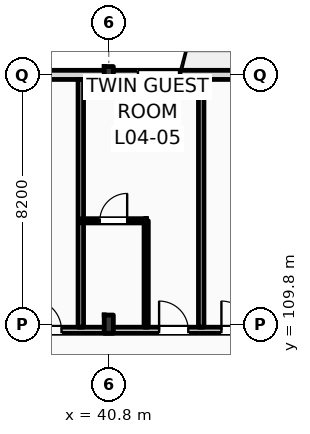
"""IFC4 building model, lengths in metres.
Left out: names, types, materials, properties, quantities, classifications, styles, units other than length and angle.
Written with IfcOpenShell. Run it as: python <this file> out.ifc"""

import sys

from ifc_helpers import new_model, si_unit, direction, frame, frame_2d, origin, origin_2d, place, context, subcontext, project, spatial, rectangle, i_section, extrude, element, fill, save


model = new_model("IFC4")
c1 = context("Model", 3, precision=1e-05, world=origin(), true_north=direction((0.0, 1.0)))
c2 = subcontext(c1, "Body", "Model", "MODEL_VIEW")
j1 = project(units=[si_unit("LENGTHUNIT", "METRE"), si_unit("PLANEANGLEUNIT", "RADIAN")], contexts=[c1])
p1 = place(None, origin())
s1 = spatial("IfcSite", under=j1, at=p1, CompositionType="ELEMENT")
p2 = place(p1, origin())
s2 = spatial("IfcBuilding", under=s1, at=p2, CompositionType="ELEMENT")
p3 = place(p2, frame((0.0, 0.0, 20.4)))
s3 = spatial("IfcBuildingStorey", under=s2, at=p3, CompositionType="ELEMENT", Elevation=20.4)
p4 = place(p3, frame((40.8, 109.8, 0.0), z_axis=(0.0, 0.0, 1.0), x_axis=(1.0, 0.0, 0.0)))
e1 = element("IfcColumn", 1, at=p4, inside=s3, PredefinedType="COLUMN", context=c2, shape_type="SweptSolid", body=[
    extrude(i_section(OverallWidth=0.3, OverallDepth=0.6, WebThickness=0.015, FlangeThickness=0.03, FilletRadius=0.027, at=origin_2d()), origin(), (0.0, 0.0, 1.0), 4.2),
])
p5 = place(p3, frame((40.8, 118.0, 0.0), z_axis=(0.0, 0.0, 1.0), x_axis=(1.0, 0.0, 0.0)))
e2 = element("IfcColumn", 2, at=p5, inside=s3, PredefinedType="COLUMN", context=c2, shape_type="SweptSolid", body=[
    extrude(i_section(OverallWidth=0.3, OverallDepth=0.55, WebThickness=0.015, FlangeThickness=0.029, FilletRadius=0.027, at=origin_2d()), origin(), (0.0, 0.0, 1.0), 4.2),
])
p6 = place(p3, frame((22.5, 118.0, 0.0), z_axis=(0.0, 0.0, 1.0), x_axis=(1.0, 0.0, 0.0)))
e3 = element("IfcWall", 3, at=p6, inside=s3, PredefinedType="STANDARD", context=c2, shape_type="SweptSolid", body=[
    extrude(rectangle(XDim=97.5, YDim=0.3, at=frame_2d((48.75, 0.0))), origin(), (0.0, 0.0, 1.0), 3.38),
])
p7 = place(p6, frame((0.91, 0.0, 0.9)))
e4 = element("IfcOpeningElement", 4, at=p7, cuts=e3, PredefinedType="OPENING", context=c2, shape_type="SweptSolid", body=[
    extrude(rectangle(XDim=0.9, YDim=1.8, at=frame_2d((0.45, 0.9))), frame((0.0, 0.16, 0.0), z_axis=(0.0, -1.0, 0.0), x_axis=(1.0, 0.0, 0.0)), (0.0, 0.0, 1.0), 0.32),
])
p8 = place(p6, frame((6.36, 0.0, 0.0)))
e5 = element("IfcOpeningElement", 5, at=p8, cuts=e3, PredefinedType="OPENING", context=c2, shape_type="SweptSolid", body=[
    extrude(rectangle(XDim=1.2, YDim=2.25, at=frame_2d((0.6, 1.125))), frame((0.0, 0.16, 0.0), z_axis=(0.0, -1.0, 0.0), x_axis=(1.0, 0.0, 0.0)), (0.0, 0.0, 1.0), 0.32),
])
p9 = place(p6, frame((11.41, 0.0, 0.9)))
e6 = element("IfcOpeningElement", 6, at=p9, cuts=e3, PredefinedType="OPENING", context=c2, shape_type="SweptSolid", body=[
    extrude(rectangle(XDim=1.1, YDim=1.9, at=frame_2d((0.55, 0.95))), frame((0.0, 0.16, 0.0), z_axis=(0.0, -1.0, 0.0), x_axis=(1.0, 0.0, 0.0)), (0.0, 0.0, 1.0), 0.32),
])
p10 = place(p6, frame((14.335, 0.0, 0.9)))
e7 = element("IfcOpeningElement", 7, at=p10, cuts=e3, PredefinedType="OPENING", context=c2, shape_type="SweptSolid", body=[
    extrude(rectangle(XDim=1.65, YDim=1.95, at=frame_2d((0.825, 0.975))), frame((0.0, 0.16, 0.0), z_axis=(0.0, -1.0, 0.0), x_axis=(1.0, 0.0, 0.0)), (0.0, 0.0, 1.0), 0.32),
])
p11 = place(p6, frame((19.26, 0.0, 0.9)))
e8 = element("IfcOpeningElement", 8, at=p11, cuts=e3, PredefinedType="OPENING", context=c2, shape_type="SweptSolid", body=[
    extrude(rectangle(XDim=1.35, YDim=2.0, at=frame_2d((0.675, 1.0))), frame((0.0, 0.16, 0.0), z_axis=(0.0, -1.0, 0.0), x_axis=(1.0, 0.0, 0.0)), (0.0, 0.0, 1.0), 0.32),
])
p12 = place(p6, frame((22.8, 0.0, 0.0)))
e9 = element("IfcOpeningElement", 9, at=p12, cuts=e3, PredefinedType="OPENING", context=c2, shape_type="SweptSolid", body=[
    extrude(rectangle(XDim=1.2, YDim=2.25, at=frame_2d((0.6, 1.125))), frame((0.0, 0.16, 0.0), z_axis=(0.0, -1.0, 0.0), x_axis=(1.0, 0.0, 0.0)), (0.0, 0.0, 1.0), 0.32),
])
p13 = place(p6, frame((26.91, 0.0, 0.9)))
e10 = element("IfcOpeningElement", 10, at=p13, cuts=e3, PredefinedType="OPENING", context=c2, shape_type="SweptSolid", body=[
    extrude(rectangle(XDim=2.1, YDim=2.1, at=frame_2d((1.05, 1.05))), frame((0.0, 0.16, 0.0), z_axis=(0.0, -1.0, 0.0), x_axis=(1.0, 0.0, 0.0)), (0.0, 0.0, 1.0), 0.32),
])
p14 = place(p6, frame((30.835, 0.0, 0.9)))
e11 = element("IfcOpeningElement", 11, at=p14, cuts=e3, PredefinedType="OPENING", context=c2, shape_type="SweptSolid", body=[
    extrude(rectangle(XDim=2.25, YDim=2.15, at=frame_2d((1.125, 1.075))), frame((0.0, 0.16, 0.0), z_axis=(0.0, -1.0, 0.0), x_axis=(1.0, 0.0, 0.0)), (0.0, 0.0, 1.0), 0.32),
])
p15 = place(p6, frame((34.96, 0.0, 0.9)))
e12 = element("IfcOpeningElement", 12, at=p15, cuts=e3, PredefinedType="OPENING", context=c2, shape_type="SweptSolid", body=[
    extrude(rectangle(XDim=2.4, YDim=2.2, at=frame_2d((1.2, 1.1))), frame((0.0, 0.16, 0.0), z_axis=(0.0, -1.0, 0.0), x_axis=(1.0, 0.0, 0.0)), (0.0, 0.0, 1.0), 0.32),
])
p16 = place(p6, frame((39.0, 0.0, 0.0)))
e13 = element("IfcOpeningElement", 13, at=p16, cuts=e3, PredefinedType="OPENING", context=c2, shape_type="SweptSolid", body=[
    extrude(rectangle(XDim=1.2, YDim=2.25, at=frame_2d((0.6, 1.125))), frame((0.0, 0.16, 0.0), z_axis=(0.0, -1.0, 0.0), x_axis=(1.0, 0.0, 0.0)), (0.0, 0.0, 1.0), 0.32),
])
p17 = place(p6, frame((43.21, 0.0, 0.9)))
e14 = element("IfcOpeningElement", 14, at=p17, cuts=e3, PredefinedType="OPENING", context=c2, shape_type="SweptSolid", body=[
    extrude(rectangle(XDim=2.7, YDim=2.3, at=frame_2d((1.35, 1.15))), frame((0.0, 0.16, 0.0), z_axis=(0.0, -1.0, 0.0), x_axis=(1.0, 0.0, 0.0)), (0.0, 0.0, 1.0), 0.32),
])
p18 = place(p6, frame((47.335, 0.0, 0.9)))
e15 = element("IfcOpeningElement", 15, at=p18, cuts=e3, PredefinedType="OPENING", context=c2, shape_type="SweptSolid", body=[
    extrude(rectangle(XDim=1.35, YDim=2.3, at=frame_2d((0.675, 1.15))), frame((0.0, 0.16, 0.0), z_axis=(0.0, -1.0, 0.0), x_axis=(1.0, 0.0, 0.0)), (0.0, 0.0, 1.0), 0.32),
])
p19 = place(p6, frame((52.74, 0.0, 0.0)))
e16 = element("IfcOpeningElement", 16, at=p19, cuts=e3, PredefinedType="OPENING", context=c2, shape_type="SweptSolid", body=[
    extrude(rectangle(XDim=1.2, YDim=2.25, at=frame_2d((0.6, 1.125))), frame((0.0, 0.16, 0.0), z_axis=(0.0, -1.0, 0.0), x_axis=(1.0, 0.0, 0.0)), (0.0, 0.0, 1.0), 0.32),
])
p20 = place(p6, frame((55.36, 0.0, 0.9)))
e17 = element("IfcOpeningElement", 17, at=p20, cuts=e3, PredefinedType="OPENING", context=c2, shape_type="SweptSolid", body=[
    extrude(rectangle(XDim=1.1, YDim=2.3, at=frame_2d((0.55, 1.15))), frame((0.0, 0.16, 0.0), z_axis=(0.0, -1.0, 0.0), x_axis=(1.0, 0.0, 0.0)), (0.0, 0.0, 1.0), 0.32),
])
p21 = place(p6, frame((59.99, 0.0, 0.9)))
e18 = element("IfcOpeningElement", 18, at=p21, cuts=e3, PredefinedType="OPENING", context=c2, shape_type="SweptSolid", body=[
    extrude(rectangle(XDim=2.74, YDim=2.3, at=frame_2d((1.37, 1.15))), frame((0.0, 0.16, 0.0), z_axis=(0.0, -1.0, 0.0), x_axis=(1.0, 0.0, 0.0)), (0.0, 0.0, 1.0), 0.32),
])
p22 = place(p6, frame((65.95, 0.0, 0.9)))
e19 = element("IfcOpeningElement", 19, at=p22, cuts=e3, PredefinedType="OPENING", context=c2, shape_type="SweptSolid", body=[
    extrude(rectangle(XDim=1.35, YDim=2.3, at=frame_2d((0.675, 1.15))), frame((0.0, 0.16, 0.0), z_axis=(0.0, -1.0, 0.0), x_axis=(1.0, 0.0, 0.0)), (0.0, 0.0, 1.0), 0.32),
])
p23 = place(p6, frame((69.16, 0.0, 0.0)))
e20 = element("IfcOpeningElement", 20, at=p23, cuts=e3, PredefinedType="OPENING", context=c2, shape_type="SweptSolid", body=[
    extrude(rectangle(XDim=1.2, YDim=2.25, at=frame_2d((0.6, 1.125))), frame((0.0, 0.16, 0.0), z_axis=(0.0, -1.0, 0.0), x_axis=(1.0, 0.0, 0.0)), (0.0, 0.0, 1.0), 0.32),
])
p24 = place(p6, frame((73.75, 0.0, 0.9)))
e21 = element("IfcOpeningElement", 21, at=p24, cuts=e3, PredefinedType="OPENING", context=c2, shape_type="SweptSolid", body=[
    extrude(rectangle(XDim=1.8, YDim=2.3, at=frame_2d((0.9, 1.15))), frame((0.0, 0.16, 0.0), z_axis=(0.0, -1.0, 0.0), x_axis=(1.0, 0.0, 0.0)), (0.0, 0.0, 1.0), 0.32),
])
p25 = place(p6, frame((76.79, 0.0, 0.9)))
e22 = element("IfcOpeningElement", 22, at=p25, cuts=e3, PredefinedType="OPENING", context=c2, shape_type="SweptSolid", body=[
    extrude(rectangle(XDim=2.74, YDim=2.3, at=frame_2d((1.37, 1.15))), frame((0.0, 0.16, 0.0), z_axis=(0.0, -1.0, 0.0), x_axis=(1.0, 0.0, 0.0)), (0.0, 0.0, 1.0), 0.32),
])
p26 = place(p6, frame((81.55, 0.0, 0.9)))
e23 = element("IfcOpeningElement", 23, at=p26, cuts=e3, PredefinedType="OPENING", context=c2, shape_type="SweptSolid", body=[
    extrude(rectangle(XDim=1.8, YDim=2.3, at=frame_2d((0.9, 1.15))), frame((0.0, 0.16, 0.0), z_axis=(0.0, -1.0, 0.0), x_axis=(1.0, 0.0, 0.0)), (0.0, 0.0, 1.0), 0.32),
])
p27 = place(p6, frame((86.01, 0.0, 0.9)))
e24 = element("IfcOpeningElement", 24, at=p27, cuts=e3, PredefinedType="OPENING", context=c2, shape_type="SweptSolid", body=[
    extrude(rectangle(XDim=1.1, YDim=1.5, at=frame_2d((0.55, 0.75))), frame((0.0, 0.16, 0.0), z_axis=(0.0, -1.0, 0.0), x_axis=(1.0, 0.0, 0.0)), (0.0, 0.0, 1.0), 0.32),
])
p28 = place(p6, frame((90.135, 0.0, 0.9)))
e25 = element("IfcOpeningElement", 25, at=p28, cuts=e3, PredefinedType="OPENING", context=c2, shape_type="SweptSolid", body=[
    extrude(rectangle(XDim=1.25, YDim=1.6, at=frame_2d((0.625, 0.8))), frame((0.0, 0.16, 0.0), z_axis=(0.0, -1.0, 0.0), x_axis=(1.0, 0.0, 0.0)), (0.0, 0.0, 1.0), 0.32),
])
p29 = place(p6, frame((94.34, 0.0, 0.9)))
e26 = element("IfcOpeningElement", 26, at=p29, cuts=e3, PredefinedType="OPENING", context=c2, shape_type="SweptSolid", body=[
    extrude(rectangle(XDim=1.4, YDim=1.7, at=frame_2d((0.7, 0.85))), frame((0.0, 0.16, 0.0), z_axis=(0.0, -1.0, 0.0), x_axis=(1.0, 0.0, 0.0)), (0.0, 0.0, 1.0), 0.32),
])
p30 = place(p3, frame((10.65, 109.6, 0.0), z_axis=(0.0, 0.0, 1.0), x_axis=(1.0, 0.0, 0.0)))
e27 = element("IfcWall", 27, at=p30, inside=s3, PredefinedType="PARTITIONING", context=c2, shape_type="SweptSolid", body=[
    extrude(rectangle(XDim=109.21, YDim=0.2, at=frame_2d((54.605, 0.0))), origin(), (0.0, 0.0, 1.0), 3.38),
])
p31 = place(p30, frame((12.535, 0.0, 0.0)))
e28 = element("IfcOpeningElement", 28, at=p31, cuts=e27, PredefinedType="OPENING", context=c2, shape_type="SweptSolid", body=[
    extrude(rectangle(XDim=1.02, YDim=2.2, at=frame_2d((0.51, 1.1))), frame((0.0, 0.11, 0.0), z_axis=(0.0, -1.0, 0.0), x_axis=(1.0, 0.0, 0.0)), (0.0, 0.0, 1.0), 0.22),
])
p32 = place(p30, frame((19.175, 0.0, 0.0)))
e29 = element("IfcOpeningElement", 29, at=p32, cuts=e27, PredefinedType="OPENING", context=c2, shape_type="SweptSolid", body=[
    extrude(rectangle(XDim=1.02, YDim=2.2, at=frame_2d((0.51, 1.1))), frame((0.0, 0.11, 0.0), z_axis=(0.0, -1.0, 0.0), x_axis=(1.0, 0.0, 0.0)), (0.0, 0.0, 1.0), 0.22),
])
p33 = place(p30, frame((23.375, 0.0, 0.0)))
e30 = element("IfcOpeningElement", 30, at=p33, cuts=e27, PredefinedType="OPENING", context=c2, shape_type="SweptSolid", body=[
    extrude(rectangle(XDim=1.02, YDim=2.2, at=frame_2d((0.51, 1.1))), frame((0.0, 0.11, 0.0), z_axis=(0.0, -1.0, 0.0), x_axis=(1.0, 0.0, 0.0)), (0.0, 0.0, 1.0), 0.22),
])
p34 = place(p30, frame((27.575, 0.0, 0.0)))
e31 = element("IfcOpeningElement", 31, at=p34, cuts=e27, PredefinedType="OPENING", context=c2, shape_type="SweptSolid", body=[
    extrude(rectangle(XDim=1.02, YDim=2.2, at=frame_2d((0.51, 1.1))), frame((0.0, 0.11, 0.0), z_axis=(0.0, -1.0, 0.0), x_axis=(1.0, 0.0, 0.0)), (0.0, 0.0, 1.0), 0.22),
])
p35 = place(p30, frame((31.805, 0.0, 0.0)))
e32 = element("IfcOpeningElement", 32, at=p35, cuts=e27, PredefinedType="OPENING", context=c2, shape_type="SweptSolid", body=[
    extrude(rectangle(XDim=0.96, YDim=2.2, at=frame_2d((0.48, 1.1))), frame((0.0, 0.11, 0.0), z_axis=(0.0, -1.0, 0.0), x_axis=(1.0, 0.0, 0.0)), (0.0, 0.0, 1.0), 0.22),
])
p36 = place(p30, frame((33.855, 0.0, 0.0)))
e33 = element("IfcOpeningElement", 33, at=p36, cuts=e27, PredefinedType="OPENING", context=c2, shape_type="SweptSolid", body=[
    extrude(rectangle(XDim=0.96, YDim=2.2, at=frame_2d((0.48, 1.1))), frame((0.0, 0.11, 0.0), z_axis=(0.0, -1.0, 0.0), x_axis=(1.0, 0.0, 0.0)), (0.0, 0.0, 1.0), 0.22),
])
p37 = place(p30, frame((40.205, 0.0, 0.0)))
e34 = element("IfcOpeningElement", 34, at=p37, cuts=e27, PredefinedType="OPENING", context=c2, shape_type="SweptSolid", body=[
    extrude(rectangle(XDim=0.96, YDim=2.2, at=frame_2d((0.48, 1.1))), frame((0.0, 0.11, 0.0), z_axis=(0.0, -1.0, 0.0), x_axis=(1.0, 0.0, 0.0)), (0.0, 0.0, 1.0), 0.22),
])
p38 = place(p30, frame((42.255, 0.0, 0.0)))
e35 = element("IfcOpeningElement", 35, at=p38, cuts=e27, PredefinedType="OPENING", context=c2, shape_type="SweptSolid", body=[
    extrude(rectangle(XDim=0.96, YDim=2.2, at=frame_2d((0.48, 1.1))), frame((0.0, 0.11, 0.0), z_axis=(0.0, -1.0, 0.0), x_axis=(1.0, 0.0, 0.0)), (0.0, 0.0, 1.0), 0.22),
])
p39 = place(p30, frame((48.605, 0.0, 0.0)))
e36 = element("IfcOpeningElement", 36, at=p39, cuts=e27, PredefinedType="OPENING", context=c2, shape_type="SweptSolid", body=[
    extrude(rectangle(XDim=0.96, YDim=2.2, at=frame_2d((0.48, 1.1))), frame((0.0, 0.11, 0.0), z_axis=(0.0, -1.0, 0.0), x_axis=(1.0, 0.0, 0.0)), (0.0, 0.0, 1.0), 0.22),
])
p40 = place(p30, frame((50.655, 0.0, 0.0)))
e37 = element("IfcOpeningElement", 37, at=p40, cuts=e27, PredefinedType="OPENING", context=c2, shape_type="SweptSolid", body=[
    extrude(rectangle(XDim=0.96, YDim=2.2, at=frame_2d((0.48, 1.1))), frame((0.0, 0.11, 0.0), z_axis=(0.0, -1.0, 0.0), x_axis=(1.0, 0.0, 0.0)), (0.0, 0.0, 1.0), 0.22),
])
p41 = place(p30, frame((57.005, 0.0, 0.0)))
e38 = element("IfcOpeningElement", 38, at=p41, cuts=e27, PredefinedType="OPENING", context=c2, shape_type="SweptSolid", body=[
    extrude(rectangle(XDim=0.96, YDim=2.2, at=frame_2d((0.48, 1.1))), frame((0.0, 0.11, 0.0), z_axis=(0.0, -1.0, 0.0), x_axis=(1.0, 0.0, 0.0)), (0.0, 0.0, 1.0), 0.22),
])
p42 = place(p30, frame((59.055, 0.0, 0.0)))
e39 = element("IfcOpeningElement", 39, at=p42, cuts=e27, PredefinedType="OPENING", context=c2, shape_type="SweptSolid", body=[
    extrude(rectangle(XDim=0.96, YDim=2.2, at=frame_2d((0.48, 1.1))), frame((0.0, 0.11, 0.0), z_axis=(0.0, -1.0, 0.0), x_axis=(1.0, 0.0, 0.0)), (0.0, 0.0, 1.0), 0.22),
])
p43 = place(p30, frame((65.405, 0.0, 0.0)))
e40 = element("IfcOpeningElement", 40, at=p43, cuts=e27, PredefinedType="OPENING", context=c2, shape_type="SweptSolid", body=[
    extrude(rectangle(XDim=0.96, YDim=2.2, at=frame_2d((0.48, 1.1))), frame((0.0, 0.11, 0.0), z_axis=(0.0, -1.0, 0.0), x_axis=(1.0, 0.0, 0.0)), (0.0, 0.0, 1.0), 0.22),
])
p44 = place(p30, frame((67.205, 0.0, 0.0)))
e41 = element("IfcOpeningElement", 41, at=p44, cuts=e27, PredefinedType="OPENING", context=c2, shape_type="SweptSolid", body=[
    extrude(rectangle(XDim=0.96, YDim=2.2, at=frame_2d((0.48, 1.1))), frame((0.0, 0.11, 0.0), z_axis=(0.0, -1.0, 0.0), x_axis=(1.0, 0.0, 0.0)), (0.0, 0.0, 1.0), 0.22),
])
p45 = place(p30, frame((73.805, 0.0, 0.0)))
e42 = element("IfcOpeningElement", 42, at=p45, cuts=e27, PredefinedType="OPENING", context=c2, shape_type="SweptSolid", body=[
    extrude(rectangle(XDim=0.96, YDim=2.2, at=frame_2d((0.48, 1.1))), frame((0.0, 0.11, 0.0), z_axis=(0.0, -1.0, 0.0), x_axis=(1.0, 0.0, 0.0)), (0.0, 0.0, 1.0), 0.22),
])
p46 = place(p30, frame((78.255, 0.0, 0.0)))
e43 = element("IfcOpeningElement", 43, at=p46, cuts=e27, PredefinedType="OPENING", context=c2, shape_type="SweptSolid", body=[
    extrude(rectangle(XDim=0.96, YDim=2.2, at=frame_2d((0.48, 1.1))), frame((0.0, 0.11, 0.0), z_axis=(0.0, -1.0, 0.0), x_axis=(1.0, 0.0, 0.0)), (0.0, 0.0, 1.0), 0.22),
])
p47 = place(p30, frame((82.205, 0.0, 0.0)))
e44 = element("IfcOpeningElement", 44, at=p47, cuts=e27, PredefinedType="OPENING", context=c2, shape_type="SweptSolid", body=[
    extrude(rectangle(XDim=0.96, YDim=2.2, at=frame_2d((0.48, 1.1))), frame((0.0, 0.11, 0.0), z_axis=(0.0, -1.0, 0.0), x_axis=(1.0, 0.0, 0.0)), (0.0, 0.0, 1.0), 0.22),
])
p48 = place(p30, frame((86.405, 0.0, 0.0)))
e45 = element("IfcOpeningElement", 45, at=p48, cuts=e27, PredefinedType="OPENING", context=c2, shape_type="SweptSolid", body=[
    extrude(rectangle(XDim=0.96, YDim=2.2, at=frame_2d((0.48, 1.1))), frame((0.0, 0.11, 0.0), z_axis=(0.0, -1.0, 0.0), x_axis=(1.0, 0.0, 0.0)), (0.0, 0.0, 1.0), 0.22),
])
p49 = place(p30, frame((90.605, 0.0, 0.0)))
e46 = element("IfcOpeningElement", 46, at=p49, cuts=e27, PredefinedType="OPENING", context=c2, shape_type="SweptSolid", body=[
    extrude(rectangle(XDim=0.96, YDim=2.2, at=frame_2d((0.48, 1.1))), frame((0.0, 0.11, 0.0), z_axis=(0.0, -1.0, 0.0), x_axis=(1.0, 0.0, 0.0)), (0.0, 0.0, 1.0), 0.22),
])
p50 = place(p30, frame((94.805, 0.0, 0.0)))
e47 = element("IfcOpeningElement", 47, at=p50, cuts=e27, PredefinedType="OPENING", context=c2, shape_type="SweptSolid", body=[
    extrude(rectangle(XDim=0.96, YDim=2.2, at=frame_2d((0.48, 1.1))), frame((0.0, 0.11, 0.0), z_axis=(0.0, -1.0, 0.0), x_axis=(1.0, 0.0, 0.0)), (0.0, 0.0, 1.0), 0.22),
])
p51 = place(p30, frame((99.005, 0.0, 0.0)))
e48 = element("IfcOpeningElement", 48, at=p51, cuts=e27, PredefinedType="OPENING", context=c2, shape_type="SweptSolid", body=[
    extrude(rectangle(XDim=0.96, YDim=2.2, at=frame_2d((0.48, 1.1))), frame((0.0, 0.11, 0.0), z_axis=(0.0, -1.0, 0.0), x_axis=(1.0, 0.0, 0.0)), (0.0, 0.0, 1.0), 0.22),
])
p52 = place(p30, frame((103.205, 0.0, 0.0)))
e49 = element("IfcOpeningElement", 49, at=p52, cuts=e27, PredefinedType="OPENING", context=c2, shape_type="SweptSolid", body=[
    extrude(rectangle(XDim=0.96, YDim=2.2, at=frame_2d((0.48, 1.1))), frame((0.0, 0.11, 0.0), z_axis=(0.0, -1.0, 0.0), x_axis=(1.0, 0.0, 0.0)), (0.0, 0.0, 1.0), 0.22),
])
p53 = place(p30, frame((105.335, 0.0, 0.0)))
e50 = element("IfcOpeningElement", 50, at=p53, cuts=e27, PredefinedType="OPENING", context=c2, shape_type="SweptSolid", body=[
    extrude(rectangle(XDim=0.96, YDim=2.2, at=frame_2d((0.48, 1.1))), frame((0.0, 0.11, 0.0), z_axis=(0.0, -1.0, 0.0), x_axis=(1.0, 0.0, 0.0)), (0.0, 0.0, 1.0), 0.22),
])
p54 = place(p30, frame((2.716, 0.0, 0.0)))
e51 = element("IfcOpeningElement", 51, at=p54, cuts=e27, PredefinedType="OPENING", context=c2, shape_type="SweptSolid", body=[
    extrude(rectangle(XDim=1.35, YDim=2.25, at=frame_2d((0.675, 1.125))), frame((0.0, 0.11, 0.0), z_axis=(0.0, -1.0, 0.0), x_axis=(1.0, 0.0, 0.0)), (0.0, 0.0, 1.0), 0.22),
])
p55 = place(p30, frame((6.65, 0.0, 0.0)))
e52 = element("IfcOpeningElement", 52, at=p55, cuts=e27, PredefinedType="OPENING", context=c2, shape_type="SweptSolid", body=[
    extrude(rectangle(XDim=1.35, YDim=2.25, at=frame_2d((0.675, 1.125))), frame((0.0, 0.11, 0.0), z_axis=(0.0, -1.0, 0.0), x_axis=(1.0, 0.0, 0.0)), (0.0, 0.0, 1.0), 0.22),
])
p56 = place(p30, frame((10.583, 0.0, 0.0)))
e53 = element("IfcOpeningElement", 53, at=p56, cuts=e27, PredefinedType="OPENING", context=c2, shape_type="SweptSolid", body=[
    extrude(rectangle(XDim=1.35, YDim=2.25, at=frame_2d((0.675, 1.125))), frame((0.0, 0.11, 0.0), z_axis=(0.0, -1.0, 0.0), x_axis=(1.0, 0.0, 0.0)), (0.0, 0.0, 1.0), 0.22),
])
for number, where, z_axis, x_axis in (
    (54, (39.88, 109.7, 0.0), (0.0, 0.0, 1.0), (0.0, 1.0, 0.0)),
    (55, (43.84, 109.7, 0.0), (0.0, 0.0, 1.0), (0.0, 1.0, 0.0)),
):
    element("IfcWall", number, at=place(p3, frame(where, z_axis=z_axis, x_axis=x_axis)), inside=s3, PredefinedType="PARTITIONING", context=c2, shape_type="SweptSolid", body=[
        extrude(rectangle(XDim=8.15, YDim=0.18, at=frame_2d((4.075, 0.0))), origin(), (0.0, 0.0, 1.0), 3.94),
    ])
p57 = place(p3, frame((42.03, 109.7, 0.0), z_axis=(0.0, 0.0, 1.0), x_axis=(0.0, 1.0, 0.0)))
e56 = element("IfcWall", 56, at=p57, inside=s3, PredefinedType="PARTITIONING", context=c2, shape_type="SweptSolid", body=[
    extrude(rectangle(XDim=3.5, YDim=0.14, at=frame_2d((1.75, 0.0))), origin(), (0.0, 0.0, 1.0), 3.94),
])
p58 = place(p3, frame((39.88, 113.2, 0.0), z_axis=(0.0, 0.0, 1.0), x_axis=(1.0, 0.0, 0.0)))
e57 = element("IfcWall", 57, at=p58, inside=s3, PredefinedType="PARTITIONING", context=c2, shape_type="SweptSolid", body=[
    extrude(rectangle(XDim=2.15, YDim=0.14, at=frame_2d((1.075, 0.0))), origin(), (0.0, 0.0, 1.0), 3.94),
])
p59 = place(p58, frame((0.625, 0.0, 0.0)))
e58 = element("IfcOpeningElement", 58, at=p59, cuts=e57, PredefinedType="OPENING", context=c2, shape_type="SweptSolid", body=[
    extrude(rectangle(XDim=0.9, YDim=2.1, at=frame_2d((0.45, 1.05))), frame((0.0, 0.08, 0.0), z_axis=(0.0, -1.0, 0.0), x_axis=(1.0, 0.0, 0.0)), (0.0, 0.0, 1.0), 0.16),
])
p60 = place(p11, origin())
e59 = element("IfcWindow", 59, at=p60, inside=s3, PartitioningType="DOUBLE_PANEL_VERTICAL", PredefinedType="WINDOW", context=c2, shape_type="SweptSolid", body=[
    extrude(rectangle(XDim=1.35, YDim=2.0, at=frame_2d((0.675, 1.0))), frame((0.0, 0.03, 0.0), z_axis=(0.0, -1.0, 0.0), x_axis=(1.0, 0.0, 0.0)), (0.0, 0.0, 1.0), 0.06),
])
fill(e8, e59)
p61 = place(p34, origin())
e60 = element("IfcDoor", 60, at=p61, inside=s3, OperationType="SINGLE_SWING_LEFT", PredefinedType="DOOR", context=c2, shape_type="SweptSolid", body=[
    extrude(rectangle(XDim=1.02, YDim=2.2, at=frame_2d((0.51, 1.1))), frame((0.0, 0.025, 0.0), z_axis=(0.0, -1.0, 0.0), x_axis=(1.0, 0.0, 0.0)), (0.0, 0.0, 1.0), 0.05),
])
fill(e31, e60)
p62 = place(p35, origin())
e61 = element("IfcDoor", 61, at=p62, inside=s3, OperationType="SINGLE_SWING_LEFT", PredefinedType="DOOR", context=c2, shape_type="SweptSolid", body=[
    extrude(rectangle(XDim=0.96, YDim=2.2, at=frame_2d((0.48, 1.1))), frame((0.0, 0.025, 0.0), z_axis=(0.0, -1.0, 0.0), x_axis=(1.0, 0.0, 0.0)), (0.0, 0.0, 1.0), 0.05),
])
fill(e32, e61)
p63 = place(p59, origin())
e62 = element("IfcDoor", 62, at=p63, inside=s3, OperationType="SINGLE_SWING_RIGHT", PredefinedType="DOOR", context=c2, shape_type="SweptSolid", body=[
    extrude(rectangle(XDim=0.9, YDim=2.1, at=frame_2d((0.45, 1.05))), frame((0.0, 0.025, 0.0), z_axis=(0.0, -1.0, 0.0), x_axis=(1.0, 0.0, 0.0)), (0.0, 0.0, 1.0), 0.05),
])
fill(e58, e62)
p64 = place(p36, origin())
e63 = element("IfcDoor", 63, at=p64, inside=s3, OperationType="SINGLE_SWING_LEFT", PredefinedType="DOOR", context=c2, shape_type="SweptSolid", body=[
    extrude(rectangle(XDim=0.96, YDim=2.2, at=frame_2d((0.48, 1.1))), frame((0.0, 0.025, 0.0), z_axis=(0.0, -1.0, 0.0), x_axis=(1.0, 0.0, 0.0)), (0.0, 0.0, 1.0), 0.05),
])
fill(e33, e63)
save(model, sys.argv[1])
